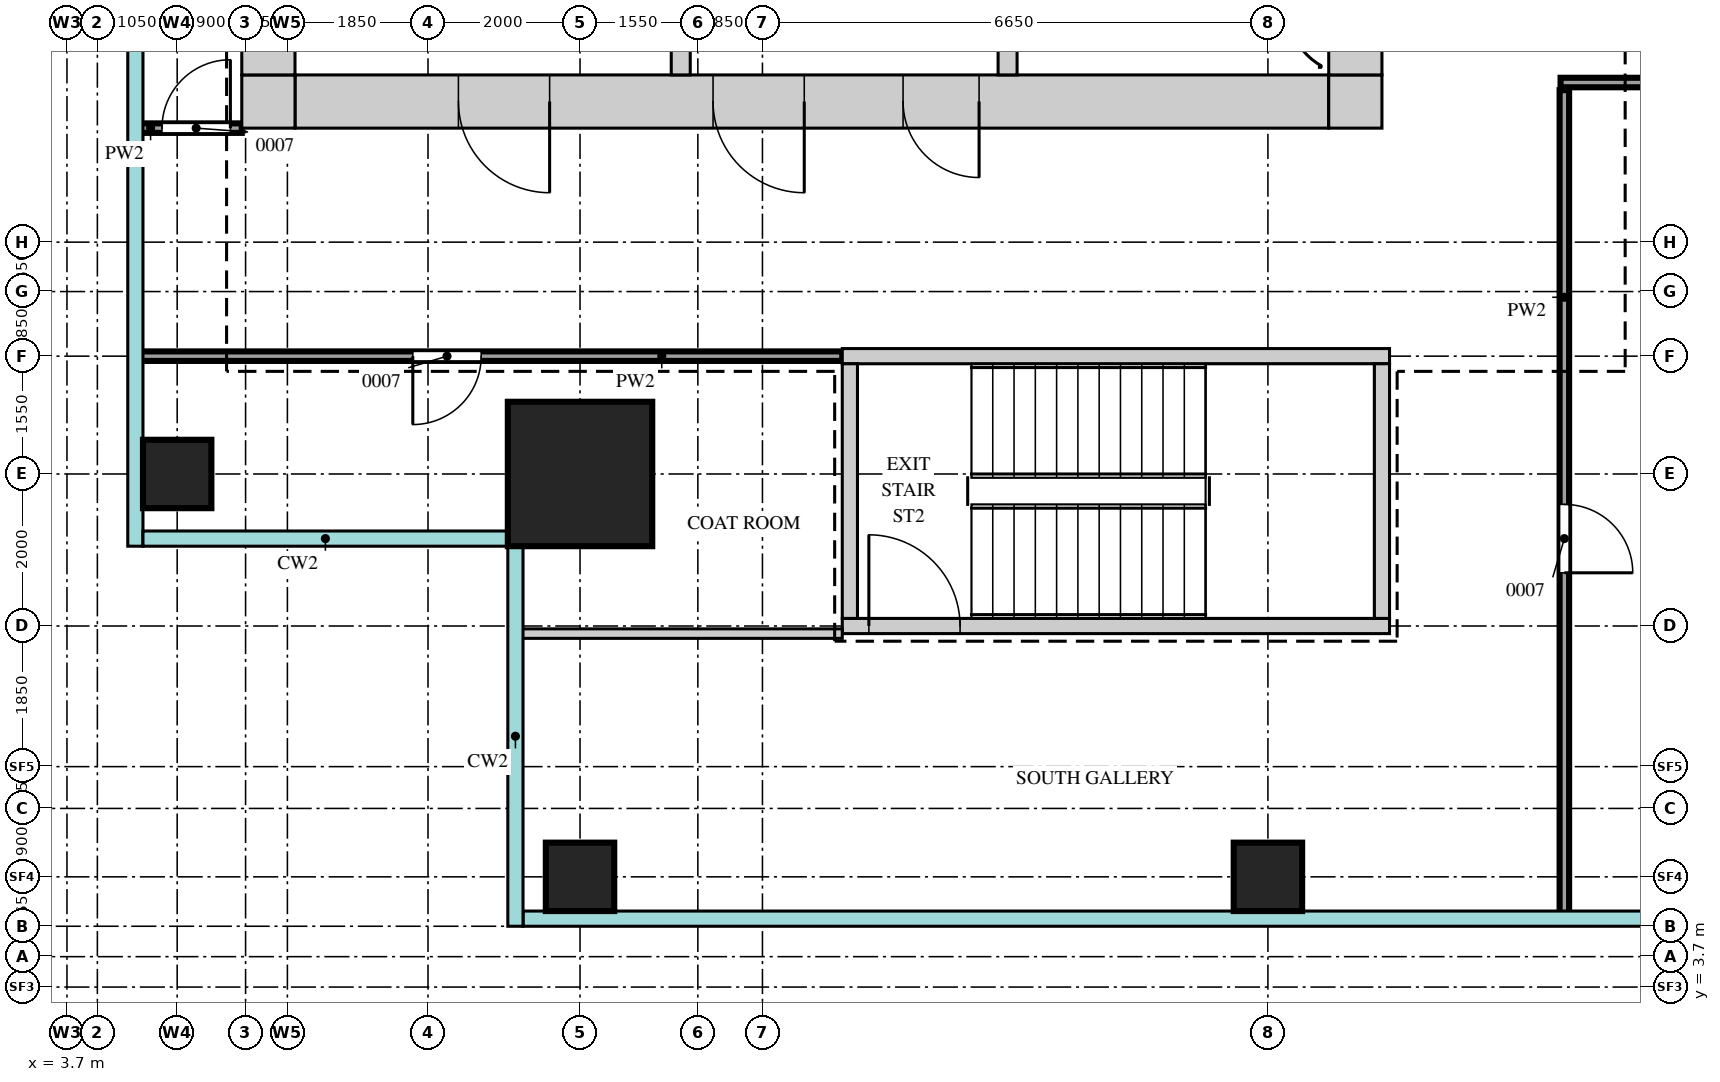
"""IFC4 building model, lengths in metres.
Left out: names, types, materials, properties, quantities, classifications, styles, units other than length and angle.
Written with IfcOpenShell. Run it as: python <this file> out.ifc"""

import sys

from ifc_helpers import new_model, si_unit, direction, frame, frame_2d, origin, origin_2d, place, context, subcontext, project, spatial, rectangle, extrude, source, transform, mapped, element, fill, save


model = new_model("IFC4")
c1 = context("Model", 3, precision=1e-05, world=origin(), true_north=direction((0.0, 1.0)))
c2 = subcontext(c1, "Body", "Model", "MODEL_VIEW")
j1 = project(units=[si_unit("LENGTHUNIT", "METRE"), si_unit("PLANEANGLEUNIT", "RADIAN")], contexts=[c1])
p1 = place(None, origin())
s1 = spatial("IfcSite", under=j1, at=p1, CompositionType="ELEMENT")
p2 = place(p1, origin())
s2 = spatial("IfcBuilding", under=s1, at=p2, CompositionType="ELEMENT")
p3 = place(p2, frame((0.0, 0.0, 262.2)))
s3 = spatial("IfcBuildingStorey", under=s2, at=p3, CompositionType="ELEMENT", Elevation=262.2)
m1 = source(origin(), c2, "Body", "SweptSolid", [
    extrude(rectangle(XDim=13.6, YDim=0.7, at=frame_2d((6.8, 0.0))), origin(), (0.0, 0.0, 1.0), 3.75),
])
p4 = place(p3, frame((6.7, 15.35, 0.0), z_axis=(0.0, 0.0, 1.0), x_axis=(1.0, 0.0, 0.0)))
e1 = element("IfcWall", 1, at=p4, inside=s3, PredefinedType="SHEAR", context=c2, shape_type="MappedRepresentation", body=[
    mapped(m1, transform((0.0, 0.0, 0.0))),
])
m2 = source(origin(), c2, "Body", "SweptSolid", [
    extrude(rectangle(XDim=1.2, YDim=2.1, at=frame_2d((0.6, 1.05))), frame((0.0, 0.36, 0.0), z_axis=(0.0, -1.0, 0.0), x_axis=(1.0, 0.0, 0.0)), (0.0, 0.0, 1.0), 0.72),
])
p5 = place(p4, frame((5.5, 0.0, 0.0)))
e2 = element("IfcOpeningElement", 2, at=p5, cuts=e1, PredefinedType="OPENING", context=c2, shape_type="MappedRepresentation", body=[
    mapped(m2, transform((0.0, 0.0, 0.0))),
])
p6 = place(p4, frame((2.15, 0.0, 0.0)))
e3 = element("IfcOpeningElement", 3, at=p6, cuts=e1, PredefinedType="OPENING", context=c2, shape_type="MappedRepresentation", body=[
    mapped(m2, transform((0.0, 0.0, 0.0))),
])
m3 = source(origin(), c2, "Body", "SweptSolid", [
    extrude(rectangle(XDim=1.0, YDim=2.1, at=frame_2d((0.5, 1.05))), frame((0.0, 0.36, 0.0), z_axis=(0.0, -1.0, 0.0), x_axis=(1.0, 0.0, 0.0)), (0.0, 0.0, 1.0), 0.72),
])
p7 = place(p4, frame((8.0, 0.0, 0.0)))
e4 = element("IfcOpeningElement", 4, at=p7, cuts=e1, PredefinedType="OPENING", context=c2, shape_type="MappedRepresentation", body=[
    mapped(m3, transform((0.0, 0.0, 0.0))),
])
m4 = source(origin(), c2, "Body", "SweptSolid", [
    extrude(rectangle(XDim=0.7, YDim=0.7, at=frame_2d((0.35, 0.0))), origin(), (0.0, 0.0, 1.0), 3.75),
])
for number, where, z_axis, x_axis in (
    (5, (20.3, 15.35, 0.0), (0.0, 0.0, 1.0), (1.0, 0.0, 0.0)),
    (6, (6.0, 15.35, 0.0), (0.0, 0.0, 1.0), (1.0, 0.0, 0.0)),
):
    element("IfcWall", number, at=place(p3, frame(where, z_axis=z_axis, x_axis=x_axis)), inside=s3, PredefinedType="SHEAR", context=c2, shape_type="MappedRepresentation", body=[
        mapped(m4, transform((0.0, 0.0, 0.0))),
    ])
m5 = source(origin(), c2, "Body", "SweptSolid", [
    extrude(rectangle(XDim=22.6, YDim=0.7, at=frame_2d((11.3, 0.0))), origin(), (0.0, 0.0, 1.0), 3.75),
])
p8 = place(p3, frame((20.65, 15.7, 0.0), z_axis=(0.0, 0.0, 1.0), x_axis=(0.0, 1.0, 0.0)))
e7 = element("IfcWall", 7, at=p8, inside=s3, PredefinedType="SHEAR", context=c2, shape_type="MappedRepresentation", body=[
    mapped(m5, transform((0.0, 0.0, 0.0))),
])
m6 = source(origin(), c2, "Body", "SweptSolid", [
    extrude(rectangle(XDim=1.8, YDim=2.1, at=frame_2d((0.9, 1.05))), frame((0.0, 0.36, 0.0), z_axis=(0.0, -1.0, 0.0), x_axis=(1.0, 0.0, 0.0)), (0.0, 0.0, 1.0), 0.72),
])
p9 = place(p8, frame((10.8, 0.0, 0.0)))
e8 = element("IfcOpeningElement", 8, at=p9, cuts=e7, PredefinedType="OPENING", context=c2, shape_type="MappedRepresentation", body=[
    mapped(m6, transform((0.0, 0.0, 0.0))),
])
m7 = source(origin(), c2, "Body", "SweptSolid", [
    extrude(rectangle(XDim=0.9, YDim=2.1, at=frame_2d((0.45, 1.05))), frame((0.0, 0.36, 0.0), z_axis=(0.0, -1.0, 0.0), x_axis=(1.0, 0.0, 0.0)), (0.0, 0.0, 1.0), 0.72),
])
p10 = place(p8, frame((0.45, 0.0, 0.0)))
e9 = element("IfcOpeningElement", 9, at=p10, cuts=e7, PredefinedType="OPENING", context=c2, shape_type="MappedRepresentation", body=[
    mapped(m7, transform((0.0, 0.0, 0.0))),
])
p11 = place(p8, frame((2.25, 0.0, 0.0)))
e10 = element("IfcOpeningElement", 10, at=p11, cuts=e7, PredefinedType="OPENING", context=c2, shape_type="MappedRepresentation", body=[
    mapped(m7, transform((0.0, 0.0, 0.0))),
])
p12 = place(p8, frame((4.95, 0.0, 0.0)))
e11 = element("IfcOpeningElement", 11, at=p12, cuts=e7, PredefinedType="OPENING", context=c2, shape_type="MappedRepresentation", body=[
    mapped(m3, transform((0.0, 0.0, 0.0))),
])
p13 = place(p3, frame((6.35, 15.7, 0.0), z_axis=(0.0, 0.0, 1.0), x_axis=(0.0, 1.0, 0.0)))
e12 = element("IfcWall", 12, at=p13, inside=s3, PredefinedType="SHEAR", context=c2, shape_type="MappedRepresentation", body=[
    mapped(m5, transform((0.0, 0.0, 0.0))),
])
m8 = source(origin(), c2, "Body", "SweptSolid", [
    extrude(rectangle(XDim=7.2, YDim=0.2, at=frame_2d((3.6, 0.0))), origin(), (0.0, 0.0, 1.0), 3.75),
])
p14 = place(p3, frame((13.9, 12.0, 0.0), z_axis=(0.0, 0.0, 1.0), x_axis=(1.0, 0.0, 0.0)))
e13 = element("IfcWall", 13, at=p14, inside=s3, PredefinedType="SHEAR", context=c2, shape_type="MappedRepresentation", body=[
    mapped(m8, transform((0.0, 0.0, 0.0))),
])
p15 = place(p3, frame((13.9, 8.45, 0.0), z_axis=(0.0, 0.0, 1.0), x_axis=(1.0, 0.0, 0.0)))
e14 = element("IfcWall", 14, at=p15, inside=s3, PredefinedType="SHEAR", context=c2, shape_type="MappedRepresentation", body=[
    mapped(m8, transform((0.0, 0.0, 0.0))),
])
m9 = source(origin(), c2, "Body", "SweptSolid", [
    extrude(rectangle(XDim=1.2, YDim=2.1, at=frame_2d((0.6, 1.05))), frame((0.0, 0.11, 0.0), z_axis=(0.0, -1.0, 0.0), x_axis=(1.0, 0.0, 0.0)), (0.0, 0.0, 1.0), 0.22),
])
p16 = place(p15, frame((0.35, 0.0, 0.0)))
e15 = element("IfcOpeningElement", 15, at=p16, cuts=e14, PredefinedType="OPENING", context=c2, shape_type="MappedRepresentation", body=[
    mapped(m9, transform((0.0, 0.0, 0.0))),
])
m10 = source(origin(), c2, "Body", "SweptSolid", [
    extrude(rectangle(XDim=3.35, YDim=0.2, at=frame_2d((1.675, 0.0))), origin(), (0.0, 0.0, 1.0), 3.75),
])
for number, where, z_axis, x_axis in (
    (16, (21.0, 8.55, 0.0), (0.0, 0.0, 1.0), (0.0, 1.0, 0.0)),
    (17, (14.0, 8.55, 0.0), (0.0, 0.0, 1.0), (0.0, 1.0, 0.0)),
):
    element("IfcWall", number, at=place(p3, frame(where, z_axis=z_axis, x_axis=x_axis)), inside=s3, PredefinedType="SHEAR", context=c2, shape_type="MappedRepresentation", body=[
        mapped(m10, transform((0.0, 0.0, 0.0))),
    ])
m11 = source(origin(), c2, "Body", "SweptSolid", [
    extrude(rectangle(XDim=3.5, YDim=0.25, at=frame_2d((1.75, 0.0))), origin(), (0.0, 0.0, 1.0), 3.75),
])
for number, where, z_axis, x_axis in (
    (18, (16.075, 15.7, 0.0), (0.0, 0.0, 1.0), (0.0, 1.0, 0.0)),
    (19, (11.775, 15.7, 0.0), (0.0, 0.0, 1.0), (0.0, 1.0, 0.0)),
):
    element("IfcWall", number, at=place(p3, frame(where, z_axis=z_axis, x_axis=x_axis)), inside=s3, PredefinedType="STANDARD", context=c2, shape_type="MappedRepresentation", body=[
        mapped(m11, transform((0.0, 0.0, 0.0))),
    ])
m12 = source(origin(), c2, "Body", "SweptSolid", [
    extrude(rectangle(XDim=1.9, YDim=1.9, at=origin_2d()), origin(), (0.0, 0.0, 1.0), 4.0),
])
p17 = place(p3, frame((10.45, 10.45, 0.0), z_axis=(0.0, 0.0, 1.0), x_axis=(1.0, 0.0, 0.0)))
e20 = element("IfcColumn", 20, at=p17, inside=s3, PredefinedType="COLUMN", context=c2, shape_type="MappedRepresentation", body=[
    mapped(m12, transform((0.0, 0.0, 0.0))),
])
m13 = source(origin(), c2, "Body", "SweptSolid", [
    extrude(rectangle(XDim=0.9, YDim=0.9, at=origin_2d()), origin(), (0.0, 0.0, 1.0), 3.75),
])
for number, where, z_axis, x_axis in (
    (21, (10.45, 5.15, 0.0), (0.0, 0.0, 1.0), (1.0, 0.0, 0.0)),
    (22, (19.5, 5.15, 0.0), (0.0, 0.0, 1.0), (1.0, 0.0, 0.0)),
    (23, (5.15, 10.45, 0.0), (0.0, 0.0, 1.0), (1.0, 0.0, 0.0)),
):
    element("IfcColumn", number, at=place(p3, frame(where, z_axis=z_axis, x_axis=x_axis)), inside=s3, PredefinedType="COLUMN", context=c2, shape_type="MappedRepresentation", body=[
        mapped(m13, transform((0.0, 0.0, 0.0))),
    ])
m14 = source(origin(), c2, "Body", "SweptSolid", [
    extrude(rectangle(XDim=10.85, YDim=0.125, at=frame_2d((5.425, 0.0))), origin(), (0.0, 0.0, 1.0), 3.8),
])
p18 = place(p3, frame((23.4, 4.65, 0.0), z_axis=(0.0, 0.0, 1.0), x_axis=(0.0, 1.0, 0.0)))
e24 = element("IfcWall", 24, at=p18, inside=s3, PredefinedType="PARTITIONING", context=c2, shape_type="MappedRepresentation", body=[
    mapped(m14, transform((0.0, 0.0, 0.0))),
])
m15 = source(origin(), c2, "Body", "SweptSolid", [
    extrude(rectangle(XDim=0.9, YDim=2.1, at=frame_2d((0.45, 1.05))), frame((0.0, 0.073, 0.0), z_axis=(0.0, -1.0, 0.0), x_axis=(1.0, 0.0, 0.0)), (0.0, 0.0, 1.0), 0.145),
])
p19 = place(p18, frame((4.5, 0.0, 0.0)))
e25 = element("IfcOpeningElement", 25, at=p19, cuts=e24, PredefinedType="OPENING", context=c2, shape_type="MappedRepresentation", body=[
    mapped(m15, transform((0.0, 0.0, 0.0))),
])
m16 = source(origin(), c2, "Body", "SweptSolid", [
    extrude(rectangle(XDim=4.25, YDim=0.125, at=frame_2d((2.125, 0.0))), origin(), (0.0, 0.0, 1.0), 3.8),
])
p20 = place(p3, frame((9.65, 8.35, 0.0), z_axis=(0.0, 0.0, 1.0), x_axis=(1.0, 0.0, 0.0)))
e26 = element("IfcWall", 26, at=p20, inside=s3, PredefinedType="PARTITIONING", context=c2, shape_type="MappedRepresentation", body=[
    mapped(m16, transform((0.0, 0.0, 0.0))),
])
m17 = source(origin(), c2, "Body", "SweptSolid", [
    extrude(rectangle(XDim=9.25, YDim=0.125, at=frame_2d((4.625, 0.0))), origin(), (0.0, 0.0, 1.0), 3.8),
])
p21 = place(p3, frame((4.65, 12.0, 0.0), z_axis=(0.0, 0.0, 1.0), x_axis=(1.0, 0.0, 0.0)))
e27 = element("IfcWall", 27, at=p21, inside=s3, PredefinedType="PARTITIONING", context=c2, shape_type="MappedRepresentation", body=[
    mapped(m17, transform((0.0, 0.0, 0.0))),
])
p22 = place(p21, frame((3.6, 0.0, 0.0)))
e28 = element("IfcOpeningElement", 28, at=p22, cuts=e27, PredefinedType="OPENING", context=c2, shape_type="MappedRepresentation", body=[
    mapped(m15, transform((0.0, 0.0, 0.0))),
])
m18 = source(origin(), c2, "Body", "SweptSolid", [
    extrude(rectangle(XDim=1.35, YDim=0.125, at=frame_2d((0.675, 0.0))), origin(), (0.0, 0.0, 1.0), 3.8),
])
p23 = place(p3, frame((4.65, 15.0, 0.0), z_axis=(0.0, 0.0, 1.0), x_axis=(1.0, 0.0, 0.0)))
e29 = element("IfcWall", 29, at=p23, inside=s3, PredefinedType="PARTITIONING", context=c2, shape_type="MappedRepresentation", body=[
    mapped(m18, transform((0.0, 0.0, 0.0))),
])
p24 = place(p23, frame((0.3, 0.0, 0.0)))
e30 = element("IfcOpeningElement", 30, at=p24, cuts=e29, PredefinedType="OPENING", context=c2, shape_type="MappedRepresentation", body=[
    mapped(m15, transform((0.0, 0.0, 0.0))),
])
m19 = source(origin(), c2, "Body", "SweptSolid", [
    extrude(rectangle(XDim=26.0, YDim=0.125, at=frame_2d((13.0, 0.0))), origin(), (0.0, 0.0, 1.0), 3.8),
])
p25 = place(p3, frame((23.35, 15.6, 0.0), z_axis=(0.0, 0.0, 1.0), x_axis=(1.0, 0.0, 0.0)))
e31 = element("IfcWall", 31, at=p25, inside=s3, PredefinedType="PARTITIONING", context=c2, shape_type="MappedRepresentation", body=[
    mapped(m19, transform((0.0, 0.0, 0.0))),
])
m20 = source(origin(), c2, "Body", "SweptSolid", [
    extrude(rectangle(XDim=1.2, YDim=2.1, at=frame_2d((0.6, 1.05))), frame((0.0, 0.073, 0.0), z_axis=(0.0, -1.0, 0.0), x_axis=(1.0, 0.0, 0.0)), (0.0, 0.0, 1.0), 0.145),
])
p26 = place(p25, frame((16.55, 0.0, 0.0)))
e32 = element("IfcOpeningElement", 32, at=p26, cuts=e31, PredefinedType="OPENING", context=c2, shape_type="MappedRepresentation", body=[
    mapped(m20, transform((0.0, 0.0, 0.0))),
])
m21 = source(origin(), c2, "Body", "SweptSolid", [
    extrude(rectangle(XDim=1.2, YDim=2.1, at=frame_2d((0.6, 1.05))), frame((0.0, 0.3, 0.0), z_axis=(0.0, -1.0, 0.0), x_axis=(1.0, 0.0, 0.0)), (0.0, 0.0, 1.0), 0.6),
])
p27 = place(p5, origin())
e33 = element("IfcDoor", 33, at=p27, inside=s3, OperationType="SINGLE_SWING_RIGHT", PredefinedType="DOOR", context=c2, shape_type="MappedRepresentation", body=[
    mapped(m21, transform((0.0, 0.0, 0.0))),
])
fill(e2, e33)
p28 = place(p6, origin())
e34 = element("IfcDoor", 34, at=p28, inside=s3, OperationType="SINGLE_SWING_RIGHT", PredefinedType="DOOR", context=c2, shape_type="MappedRepresentation", body=[
    mapped(m21, transform((0.0, 0.0, 0.0))),
])
fill(e3, e34)
m22 = source(origin(), c2, "Body", "SweptSolid", [
    extrude(rectangle(XDim=1.0, YDim=2.1, at=frame_2d((0.5, 1.05))), frame((0.0, 0.3, 0.0), z_axis=(0.0, -1.0, 0.0), x_axis=(1.0, 0.0, 0.0)), (0.0, 0.0, 1.0), 0.6),
])
p29 = place(p7, origin())
e35 = element("IfcDoor", 35, at=p29, inside=s3, OperationType="SINGLE_SWING_RIGHT", PredefinedType="DOOR", context=c2, shape_type="MappedRepresentation", body=[
    mapped(m22, transform((0.0, 0.0, 0.0))),
])
fill(e4, e35)
m23 = source(origin(), c2, "Body", "SweptSolid", [
    extrude(rectangle(XDim=0.9, YDim=2.1, at=frame_2d((0.45, 1.05))), frame((0.0, 0.025, 0.0), z_axis=(0.0, -1.0, 0.0), x_axis=(1.0, 0.0, 0.0)), (0.0, 0.0, 1.0), 0.05),
])
p30 = place(p24, origin())
e36 = element("IfcDoor", 36, at=p30, inside=s3, OperationType="SINGLE_SWING_LEFT", PredefinedType="DOOR", context=c2, shape_type="MappedRepresentation", body=[
    mapped(m23, transform((0.0, 0.0, 0.0))),
])
fill(e30, e36)
p31 = place(p22, origin())
e37 = element("IfcDoor", 37, at=p31, inside=s3, OperationType="SINGLE_SWING_LEFT", PredefinedType="DOOR", context=c2, shape_type="MappedRepresentation", body=[
    mapped(m23, transform((0.0, 0.0, 0.0))),
])
fill(e28, e37)
p32 = place(p19, origin())
e38 = element("IfcDoor", 38, at=p32, inside=s3, OperationType="SINGLE_SWING_LEFT", PredefinedType="DOOR", context=c2, shape_type="MappedRepresentation", body=[
    mapped(m23, transform((0.0, 0.0, 0.0))),
])
fill(e25, e38)
m24 = source(origin(), c2, "Body", "SweptSolid", [
    extrude(rectangle(XDim=1.2, YDim=2.1, at=frame_2d((0.6, 1.05))), frame((0.0, 0.025, 0.0), z_axis=(0.0, -1.0, 0.0), x_axis=(1.0, 0.0, 0.0)), (0.0, 0.0, 1.0), 0.05),
])
p33 = place(p16, origin())
e39 = element("IfcDoor", 39, at=p33, inside=s3, OperationType="SINGLE_SWING_RIGHT", PredefinedType="DOOR", context=c2, shape_type="MappedRepresentation", body=[
    mapped(m24, transform((0.0, 0.0, 0.0))),
])
fill(e15, e39)
save(model, sys.argv[1])
